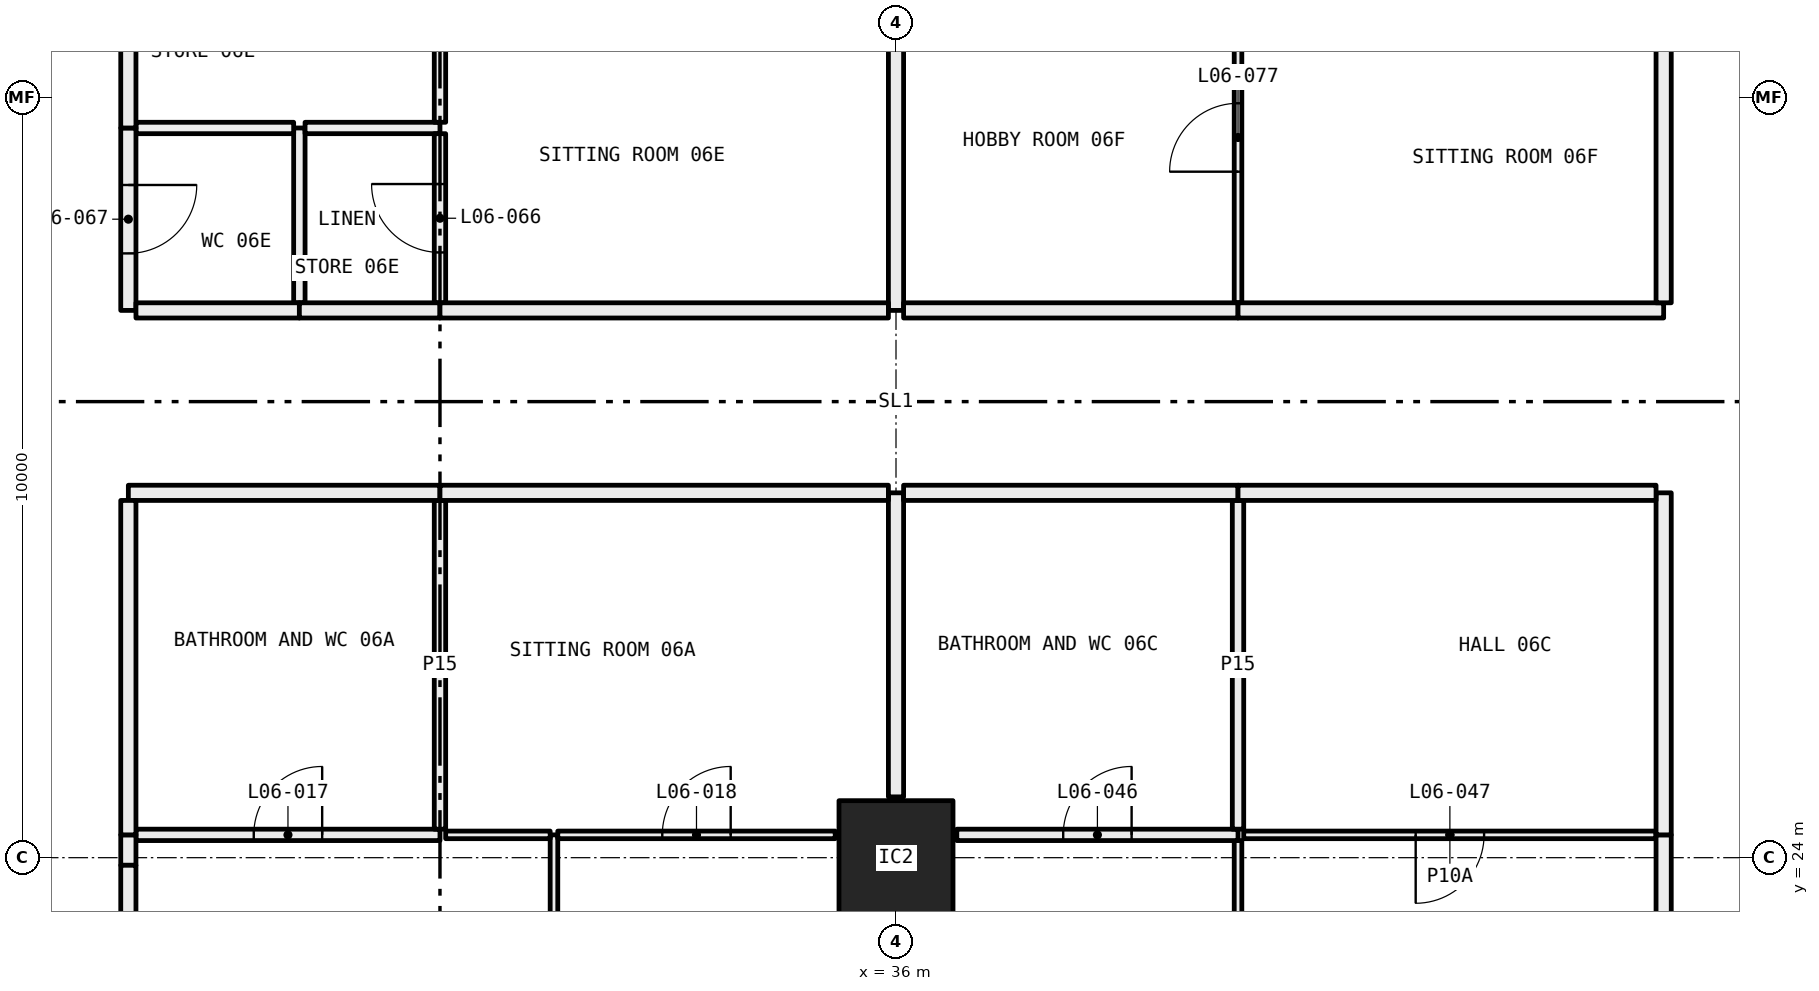
"""IFC4 building model, lengths in metres.
Left out: names, types, materials, properties, quantities, classifications, styles, units other than length and angle.
Written with IfcOpenShell. Run it as: python <this file> out.ifc"""

import sys

from ifc_helpers import new_model, si_unit, direction, frame, frame_2d, origin, origin_2d, place, context, subcontext, project, spatial, rectangle, hollow_rectangle, extrude, element, fill, save


model = new_model("IFC4")
c1 = context("Model", 3, precision=1e-05, world=origin(), true_north=direction((0.0, 1.0)))
c2 = subcontext(c1, "Body", "Model", "MODEL_VIEW")
j1 = project(units=[si_unit("LENGTHUNIT", "METRE"), si_unit("PLANEANGLEUNIT", "RADIAN")], contexts=[c1])
p1 = place(None, origin())
s1 = spatial("IfcSite", under=j1, at=p1, CompositionType="ELEMENT")
p2 = place(p1, origin())
s2 = spatial("IfcBuilding", under=s1, at=p2, CompositionType="ELEMENT")
p3 = place(p2, frame((0.0, 0.0, 33.45)))
s3 = spatial("IfcBuildingStorey", under=s2, at=p3, CompositionType="ELEMENT", Elevation=33.45)
p4 = place(p3, frame((36.0, 24.0, 0.0), z_axis=(0.0, 0.0, 1.0), x_axis=(1.0, 0.0, 0.0)))
e1 = element("IfcColumn", 1, at=p4, inside=s3, PredefinedType="COLUMN", context=c2, shape_type="SweptSolid", body=[
    extrude(hollow_rectangle(XDim=1.5, YDim=1.5, WallThickness=0.065, at=origin_2d()), origin(), (0.0, 0.0, 1.0), 3.05),
])
p5 = place(p3, frame((31.5, 18.05, 0.0), z_axis=(0.0, 0.0, 1.0), x_axis=(0.0, 1.0, 0.0)))
e2 = element("IfcWall", 2, at=p5, inside=s3, PredefinedType="PARTITIONING", context=c2, shape_type="SweptSolid", body=[
    extrude(rectangle(XDim=6.25, YDim=0.1, at=frame_2d((3.125, 0.0))), origin(), (0.0, 0.0, 1.0), 2.45),
])
p6 = place(p5, frame((2.675, 0.0, 0.0)))
e3 = element("IfcOpeningElement", 3, at=p6, cuts=e2, PredefinedType="OPENING", context=c2, shape_type="SweptSolid", body=[
    extrude(rectangle(XDim=0.9, YDim=2.1, at=frame_2d((0.45, 1.05))), frame((0.0, 0.06, 0.0), z_axis=(0.0, -1.0, 0.0), x_axis=(1.0, 0.0, 0.0)), (0.0, 0.0, 1.0), 0.12),
])
p7 = place(p3, frame((30.0, 24.3, 0.0), z_axis=(0.0, 0.0, 1.0), x_axis=(-1.0, 0.0, 0.0)))
e4 = element("IfcWall", 4, at=p7, inside=s3, PredefinedType="PARTITIONING", context=c2, shape_type="SweptSolid", body=[
    extrude(rectangle(XDim=4.0, YDim=0.15, at=frame_2d((2.0, 0.0))), origin(), (0.0, 0.0, 1.0), 3.05),
])
p8 = place(p7, frame((1.55, 0.0, 0.0)))
e5 = element("IfcOpeningElement", 5, at=p8, cuts=e4, PredefinedType="OPENING", context=c2, shape_type="SweptSolid", body=[
    extrude(rectangle(XDim=0.9, YDim=2.1, at=frame_2d((0.45, 1.05))), frame((0.0, 0.085, 0.0), z_axis=(0.0, -1.0, 0.0), x_axis=(1.0, 0.0, 0.0)), (0.0, 0.0, 1.0), 0.17),
])
p9 = place(p3, frame((31.45, 24.3, 0.0), z_axis=(0.0, 0.0, 1.0), x_axis=(-1.0, 0.0, 0.0)))
e6 = element("IfcWall", 6, at=p9, inside=s3, PredefinedType="PARTITIONING", context=c2, shape_type="SweptSolid", body=[
    extrude(rectangle(XDim=1.375, YDim=0.1, at=frame_2d((0.688, 0.0))), origin(), (0.0, 0.0, 1.0), 3.05),
])
p10 = place(p3, frame((25.9, 24.3, 0.0), z_axis=(0.0, 0.0, 1.0), x_axis=(0.0, -1.0, 0.0)))
e7 = element("IfcWall", 7, at=p10, inside=s3, PredefinedType="PARTITIONING", context=c2, shape_type="SweptSolid", body=[
    extrude(rectangle(XDim=0.4, YDim=0.2, at=frame_2d((0.2, 0.0))), origin(), (0.0, 0.0, 1.0), 2.45),
])
p11 = place(p3, frame((25.9, 23.9, 0.0), z_axis=(0.0, 0.0, 1.0), x_axis=(0.0, -1.0, 0.0)))
e8 = element("IfcWall", 8, at=p11, inside=s3, PredefinedType="PARTITIONING", context=c2, shape_type="SweptSolid", body=[
    extrude(rectangle(XDim=5.8, YDim=0.2, at=frame_2d((2.9, 0.0))), origin(), (0.0, 0.0, 1.0), 3.05),
])
p12 = place(p3, frame((35.2, 24.3, 0.0), z_axis=(0.0, 0.0, 1.0), x_axis=(-1.0, 0.0, 0.0)))
e9 = element("IfcWall", 9, at=p12, inside=s3, PredefinedType="PARTITIONING", context=c2, shape_type="SweptSolid", body=[
    extrude(rectangle(XDim=3.65, YDim=0.1, at=frame_2d((1.825, 0.0))), origin(), (0.0, 0.0, 1.0), 3.05),
])
p13 = place(p12, frame((1.375, 0.0, 0.0)))
e10 = element("IfcOpeningElement", 10, at=p13, cuts=e9, PredefinedType="OPENING", context=c2, shape_type="SweptSolid", body=[
    extrude(rectangle(XDim=0.9, YDim=2.1, at=frame_2d((0.45, 1.05))), frame((0.0, 0.06, 0.0), z_axis=(0.0, -1.0, 0.0), x_axis=(1.0, 0.0, 0.0)), (0.0, 0.0, 1.0), 0.12),
])
p14 = place(p3, frame((30.0, 24.375, 0.0), z_axis=(0.0, 0.0, 1.0), x_axis=(0.0, 1.0, 0.0)))
e11 = element("IfcWall", 11, at=p14, inside=s3, PredefinedType="PARTITIONING", context=c2, shape_type="SweptSolid", body=[
    extrude(rectangle(XDim=4.325, YDim=0.15, at=frame_2d((2.163, 0.0))), origin(), (0.0, 0.0, 1.0), 3.05),
])
p15 = place(p3, frame((30.0, 28.8, 0.0), z_axis=(0.0, 0.0, 1.0), x_axis=(-1.0, 0.0, 0.0)))
e12 = element("IfcWall", 12, at=p15, inside=s3, PredefinedType="PARTITIONING", context=c2, shape_type="SweptSolid", body=[
    extrude(rectangle(XDim=4.1, YDim=0.2, at=frame_2d((2.05, 0.0))), origin(), (0.0, 0.0, 1.0), 3.05),
])
p16 = place(p3, frame((25.9, 28.7, 0.0), z_axis=(0.0, 0.0, 1.0), x_axis=(0.0, -1.0, 0.0)))
e13 = element("IfcWall", 13, at=p16, inside=s3, PredefinedType="PARTITIONING", context=c2, shape_type="SweptSolid", body=[
    extrude(rectangle(XDim=4.4, YDim=0.2, at=frame_2d((2.2, 0.0))), origin(), (0.0, 0.0, 1.0), 3.05),
])
p17 = place(p3, frame((36.0, 24.8, 0.0), z_axis=(0.0, 0.0, 1.0), x_axis=(0.0, 1.0, 0.0)))
e14 = element("IfcWall", 14, at=p17, inside=s3, PredefinedType="PARTITIONING", context=c2, shape_type="SweptSolid", body=[
    extrude(rectangle(XDim=4.0, YDim=0.2, at=frame_2d((2.0, 0.0))), origin(), (0.0, 0.0, 1.0), 2.45),
])
p18 = place(p3, frame((35.9, 28.8, 0.0), z_axis=(0.0, 0.0, 1.0), x_axis=(-1.0, 0.0, 0.0)))
e15 = element("IfcWall", 15, at=p18, inside=s3, PredefinedType="PARTITIONING", context=c2, shape_type="SweptSolid", body=[
    extrude(rectangle(XDim=5.9, YDim=0.2, at=frame_2d((2.95, 0.0))), origin(), (0.0, 0.0, 1.0), 3.05),
])
p19 = place(p3, frame((40.5, 18.05, 0.0), z_axis=(0.0, 0.0, 1.0), x_axis=(0.0, 1.0, 0.0)))
e16 = element("IfcWall", 16, at=p19, inside=s3, PredefinedType="PARTITIONING", context=c2, shape_type="SweptSolid", body=[
    extrude(rectangle(XDim=6.175, YDim=0.1, at=frame_2d((3.087, 0.0))), origin(), (0.0, 0.0, 1.0), 2.45),
])
p20 = place(p19, frame((2.637, 0.0, 0.0)))
e17 = element("IfcOpeningElement", 17, at=p20, cuts=e16, PredefinedType="OPENING", context=c2, shape_type="SweptSolid", body=[
    extrude(rectangle(XDim=0.9, YDim=2.1, at=frame_2d((0.45, 1.05))), frame((0.0, 0.06, 0.0), z_axis=(0.0, -1.0, 0.0), x_axis=(1.0, 0.0, 0.0)), (0.0, 0.0, 1.0), 0.12),
])
p21 = place(p3, frame((40.5, 24.3, 0.0), z_axis=(0.0, 0.0, 1.0), x_axis=(-1.0, 0.0, 0.0)))
e18 = element("IfcWall", 18, at=p21, inside=s3, PredefinedType="PARTITIONING", context=c2, shape_type="SweptSolid", body=[
    extrude(rectangle(XDim=3.7, YDim=0.15, at=frame_2d((1.85, 0.0))), origin(), (0.0, 0.0, 1.0), 3.05),
])
p22 = place(p21, frame((1.4, 0.0, 0.0)))
e19 = element("IfcOpeningElement", 19, at=p22, cuts=e18, PredefinedType="OPENING", context=c2, shape_type="SweptSolid", body=[
    extrude(rectangle(XDim=0.9, YDim=2.1, at=frame_2d((0.45, 1.05))), frame((0.0, 0.085, 0.0), z_axis=(0.0, -1.0, 0.0), x_axis=(1.0, 0.0, 0.0)), (0.0, 0.0, 1.0), 0.17),
])
p23 = place(p3, frame((46.0, 24.3, 0.0), z_axis=(0.0, 0.0, 1.0), x_axis=(-1.0, 0.0, 0.0)))
e20 = element("IfcWall", 20, at=p23, inside=s3, PredefinedType="PARTITIONING", context=c2, shape_type="SweptSolid", body=[
    extrude(rectangle(XDim=5.425, YDim=0.1, at=frame_2d((2.712, 0.0))), origin(), (0.0, 0.0, 1.0), 3.05),
])
p24 = place(p23, frame((2.262, 0.0, 0.0)))
e21 = element("IfcOpeningElement", 21, at=p24, cuts=e20, PredefinedType="OPENING", context=c2, shape_type="SweptSolid", body=[
    extrude(rectangle(XDim=0.9, YDim=2.1, at=frame_2d((0.45, 1.05))), frame((0.0, 0.06, 0.0), z_axis=(0.0, -1.0, 0.0), x_axis=(1.0, 0.0, 0.0)), (0.0, 0.0, 1.0), 0.12),
])
p25 = place(p3, frame((46.1, 18.1, 0.0), z_axis=(0.0, 0.0, 1.0), x_axis=(0.0, 1.0, 0.0)))
e22 = element("IfcWall", 22, at=p25, inside=s3, PredefinedType="PARTITIONING", context=c2, shape_type="SweptSolid", body=[
    extrude(rectangle(XDim=6.2, YDim=0.2, at=frame_2d((3.1, 0.0))), origin(), (0.0, 0.0, 1.0), 2.45),
])
p26 = place(p3, frame((40.5, 24.375, 0.0), z_axis=(0.0, 0.0, 1.0), x_axis=(0.0, 1.0, 0.0)))
e23 = element("IfcWall", 23, at=p26, inside=s3, PredefinedType="PARTITIONING", context=c2, shape_type="SweptSolid", body=[
    extrude(rectangle(XDim=4.325, YDim=0.15, at=frame_2d((2.163, 0.0))), origin(), (0.0, 0.0, 1.0), 3.05),
])
p27 = place(p3, frame((40.5, 28.8, 0.0), z_axis=(0.0, 0.0, 1.0), x_axis=(-1.0, 0.0, 0.0)))
e24 = element("IfcWall", 24, at=p27, inside=s3, PredefinedType="PARTITIONING", context=c2, shape_type="SweptSolid", body=[
    extrude(rectangle(XDim=4.4, YDim=0.2, at=frame_2d((2.2, 0.0))), origin(), (0.0, 0.0, 1.0), 3.05),
])
p28 = place(p3, frame((46.1, 24.3, 0.0), z_axis=(0.0, 0.0, 1.0), x_axis=(0.0, 1.0, 0.0)))
e25 = element("IfcWall", 25, at=p28, inside=s3, PredefinedType="PARTITIONING", context=c2, shape_type="SweptSolid", body=[
    extrude(rectangle(XDim=4.5, YDim=0.2, at=frame_2d((2.25, 0.0))), origin(), (0.0, 0.0, 1.0), 3.05),
])
p29 = place(p3, frame((46.0, 28.8, 0.0), z_axis=(0.0, 0.0, 1.0), x_axis=(-1.0, 0.0, 0.0)))
e26 = element("IfcWall", 26, at=p29, inside=s3, PredefinedType="PARTITIONING", context=c2, shape_type="SweptSolid", body=[
    extrude(rectangle(XDim=5.5, YDim=0.2, at=frame_2d((2.75, 0.0))), origin(), (0.0, 0.0, 1.0), 3.05),
])
p30 = place(p3, frame((28.15, 31.3, 0.0), z_axis=(0.0, 0.0, 1.0), x_axis=(0.0, 1.0, 0.0)))
e27 = element("IfcWall", 27, at=p30, inside=s3, PredefinedType="PARTITIONING", context=c2, shape_type="SweptSolid", body=[
    extrude(rectangle(XDim=2.3, YDim=0.15, at=frame_2d((1.15, 0.0))), origin(), (0.0, 0.0, 1.0), 3.05),
])
p31 = place(p3, frame((28.075, 33.6, 0.0), z_axis=(0.0, 0.0, 1.0), x_axis=(-1.0, 0.0, 0.0)))
e28 = element("IfcWall", 28, at=p31, inside=s3, PredefinedType="PARTITIONING", context=c2, shape_type="SweptSolid", body=[
    extrude(rectangle(XDim=2.075, YDim=0.15, at=frame_2d((1.038, 0.0))), origin(), (0.0, 0.0, 1.0), 3.05),
])
p32 = place(p3, frame((25.9, 33.6, 0.0), z_axis=(0.0, 0.0, 1.0), x_axis=(0.0, -1.0, 0.0)))
e29 = element("IfcWall", 29, at=p32, inside=s3, PredefinedType="PARTITIONING", context=c2, shape_type="SweptSolid", body=[
    extrude(rectangle(XDim=2.4, YDim=0.2, at=frame_2d((1.2, 0.0))), origin(), (0.0, 0.0, 1.0), 3.05),
])
p33 = place(p32, frame((0.75, 0.0, 0.0)))
e30 = element("IfcOpeningElement", 30, at=p33, cuts=e29, PredefinedType="OPENING", context=c2, shape_type="SweptSolid", body=[
    extrude(rectangle(XDim=0.9, YDim=2.1, at=frame_2d((0.45, 1.05))), frame((0.0, 0.11, 0.0), z_axis=(0.0, -1.0, 0.0), x_axis=(1.0, 0.0, 0.0)), (0.0, 0.0, 1.0), 0.22),
])
p34 = place(p3, frame((26.0, 31.2, 0.0), z_axis=(0.0, 0.0, 1.0), x_axis=(1.0, 0.0, 0.0)))
e31 = element("IfcWall", 31, at=p34, inside=s3, PredefinedType="PARTITIONING", context=c2, shape_type="SweptSolid", body=[
    extrude(rectangle(XDim=2.15, YDim=0.2, at=frame_2d((1.075, 0.0))), origin(), (0.0, 0.0, 1.0), 3.05),
])
p35 = place(p3, frame((30.0, 33.6, 0.0), z_axis=(0.0, 0.0, 1.0), x_axis=(-1.0, 0.0, 0.0)))
e32 = element("IfcWall", 32, at=p35, inside=s3, PredefinedType="PARTITIONING", context=c2, shape_type="SweptSolid", body=[
    extrude(rectangle(XDim=1.775, YDim=0.15, at=frame_2d((0.887, 0.0))), origin(), (0.0, 0.0, 1.0), 3.05),
])
p36 = place(p3, frame((30.0, 31.3, 0.0), z_axis=(0.0, 0.0, 1.0), x_axis=(0.0, 1.0, 0.0)))
e33 = element("IfcWall", 33, at=p36, inside=s3, PredefinedType="PARTITIONING", context=c2, shape_type="SweptSolid", body=[
    extrude(rectangle(XDim=2.225, YDim=0.15, at=frame_2d((1.112, 0.0))), origin(), (0.0, 0.0, 1.0), 3.05),
])
p37 = place(p36, frame((0.663, 0.0, 0.0)))
e34 = element("IfcOpeningElement", 34, at=p37, cuts=e33, PredefinedType="OPENING", context=c2, shape_type="SweptSolid", body=[
    extrude(rectangle(XDim=0.9, YDim=2.1, at=frame_2d((0.45, 1.05))), frame((0.0, 0.085, 0.0), z_axis=(0.0, -1.0, 0.0), x_axis=(1.0, 0.0, 0.0)), (0.0, 0.0, 1.0), 0.17),
])
p38 = place(p3, frame((28.15, 31.2, 0.0), z_axis=(0.0, 0.0, 1.0), x_axis=(1.0, 0.0, 0.0)))
e35 = element("IfcWall", 35, at=p38, inside=s3, PredefinedType="PARTITIONING", context=c2, shape_type="SweptSolid", body=[
    extrude(rectangle(XDim=1.85, YDim=0.2, at=frame_2d((0.925, 0.0))), origin(), (0.0, 0.0, 1.0), 3.05),
])
p39 = place(p3, frame((30.0, 33.675, 0.0), z_axis=(0.0, 0.0, 1.0), x_axis=(0.0, 1.0, 0.0)))
e36 = element("IfcWall", 36, at=p39, inside=s3, PredefinedType="PARTITIONING", context=c2, shape_type="SweptSolid", body=[
    extrude(rectangle(XDim=1.95, YDim=0.15, at=frame_2d((0.975, 0.0))), origin(), (0.0, 0.0, 1.0), 3.05),
])
p40 = place(p3, frame((25.9, 35.7, 0.0), z_axis=(0.0, 0.0, 1.0), x_axis=(0.0, -1.0, 0.0)))
e37 = element("IfcWall", 37, at=p40, inside=s3, PredefinedType="PARTITIONING", context=c2, shape_type="SweptSolid", body=[
    extrude(rectangle(XDim=2.1, YDim=0.2, at=frame_2d((1.05, 0.0))), origin(), (0.0, 0.0, 1.0), 3.05),
])
p41 = place(p3, frame((36.0, 31.2, 0.0), z_axis=(0.0, 0.0, 1.0), x_axis=(0.0, 1.0, 0.0)))
e38 = element("IfcWall", 38, at=p41, inside=s3, PredefinedType="PARTITIONING", context=c2, shape_type="SweptSolid", body=[
    extrude(rectangle(XDim=4.0, YDim=0.2, at=frame_2d((2.0, 0.0))), origin(), (0.0, 0.0, 1.0), 2.45),
])
p42 = place(p3, frame((30.0, 31.2, 0.0), z_axis=(0.0, 0.0, 1.0), x_axis=(1.0, 0.0, 0.0)))
e39 = element("IfcWall", 39, at=p42, inside=s3, PredefinedType="PARTITIONING", context=c2, shape_type="SweptSolid", body=[
    extrude(rectangle(XDim=5.9, YDim=0.2, at=frame_2d((2.95, 0.0))), origin(), (0.0, 0.0, 1.0), 3.05),
])
p43 = place(p3, frame((40.5, 31.3, 0.0), z_axis=(0.0, 0.0, 1.0), x_axis=(0.0, 1.0, 0.0)))
e40 = element("IfcWall", 40, at=p43, inside=s3, PredefinedType="PARTITIONING", context=c2, shape_type="SweptSolid", body=[
    extrude(rectangle(XDim=4.35, YDim=0.1, at=frame_2d((2.175, 0.0))), origin(), (0.0, 0.0, 1.0), 3.05),
])
p44 = place(p43, frame((1.725, 0.0, 0.0)))
e41 = element("IfcOpeningElement", 41, at=p44, cuts=e40, PredefinedType="OPENING", context=c2, shape_type="SweptSolid", body=[
    extrude(rectangle(XDim=0.9, YDim=2.1, at=frame_2d((0.45, 1.05))), frame((0.0, 0.06, 0.0), z_axis=(0.0, -1.0, 0.0), x_axis=(1.0, 0.0, 0.0)), (0.0, 0.0, 1.0), 0.12),
])
p45 = place(p3, frame((36.1, 31.2, 0.0), z_axis=(0.0, 0.0, 1.0), x_axis=(1.0, 0.0, 0.0)))
e42 = element("IfcWall", 42, at=p45, inside=s3, PredefinedType="PARTITIONING", context=c2, shape_type="SweptSolid", body=[
    extrude(rectangle(XDim=4.4, YDim=0.2, at=frame_2d((2.2, 0.0))), origin(), (0.0, 0.0, 1.0), 3.05),
])
p46 = place(p3, frame((40.5, 31.2, 0.0), z_axis=(0.0, 0.0, 1.0), x_axis=(1.0, 0.0, 0.0)))
e43 = element("IfcWall", 43, at=p46, inside=s3, PredefinedType="PARTITIONING", context=c2, shape_type="SweptSolid", body=[
    extrude(rectangle(XDim=5.6, YDim=0.2, at=frame_2d((2.8, 0.0))), origin(), (0.0, 0.0, 1.0), 3.05),
])
p47 = place(p3, frame((46.1, 31.3, 0.0), z_axis=(0.0, 0.0, 1.0), x_axis=(0.0, 1.0, 0.0)))
e44 = element("IfcWall", 44, at=p47, inside=s3, PredefinedType="PARTITIONING", context=c2, shape_type="SweptSolid", body=[
    extrude(rectangle(XDim=4.4, YDim=0.2, at=frame_2d((2.2, 0.0))), origin(), (0.0, 0.0, 1.0), 3.05),
])
p48 = place(p8, frame((0.9, 0.0, 0.0), x_axis=(-1.0, 0.0, 0.0)))
e45 = element("IfcDoor", 45, at=p48, inside=s3, OperationType="SINGLE_SWING_LEFT", PredefinedType="DOOR", context=c2, shape_type="SweptSolid", body=[
    extrude(rectangle(XDim=0.9, YDim=2.1, at=frame_2d((0.45, 1.05))), frame((0.0, 0.025, 0.0), z_axis=(0.0, -1.0, 0.0), x_axis=(1.0, 0.0, 0.0)), (0.0, 0.0, 1.0), 0.05),
])
fill(e5, e45)
p49 = place(p13, frame((0.9, 0.0, 0.0), x_axis=(-1.0, 0.0, 0.0)))
e46 = element("IfcDoor", 46, at=p49, inside=s3, OperationType="SINGLE_SWING_LEFT", PredefinedType="DOOR", context=c2, shape_type="SweptSolid", body=[
    extrude(rectangle(XDim=0.9, YDim=2.1, at=frame_2d((0.45, 1.05))), frame((0.0, 0.025, 0.0), z_axis=(0.0, -1.0, 0.0), x_axis=(1.0, 0.0, 0.0)), (0.0, 0.0, 1.0), 0.05),
])
fill(e10, e46)
p50 = place(p22, frame((0.9, 0.0, 0.0), x_axis=(-1.0, 0.0, 0.0)))
e47 = element("IfcDoor", 47, at=p50, inside=s3, OperationType="SINGLE_SWING_LEFT", PredefinedType="DOOR", context=c2, shape_type="SweptSolid", body=[
    extrude(rectangle(XDim=0.9, YDim=2.1, at=frame_2d((0.45, 1.05))), frame((0.0, 0.025, 0.0), z_axis=(0.0, -1.0, 0.0), x_axis=(1.0, 0.0, 0.0)), (0.0, 0.0, 1.0), 0.05),
])
fill(e19, e47)
p51 = place(p24, origin())
e48 = element("IfcDoor", 48, at=p51, inside=s3, OperationType="SINGLE_SWING_LEFT", PredefinedType="DOOR", context=c2, shape_type="SweptSolid", body=[
    extrude(rectangle(XDim=0.9, YDim=2.1, at=frame_2d((0.45, 1.05))), frame((0.0, 0.025, 0.0), z_axis=(0.0, -1.0, 0.0), x_axis=(1.0, 0.0, 0.0)), (0.0, 0.0, 1.0), 0.05),
])
fill(e21, e48)
p52 = place(p37, origin())
e49 = element("IfcDoor", 49, at=p52, inside=s3, OperationType="SINGLE_SWING_LEFT", PredefinedType="DOOR", context=c2, shape_type="SweptSolid", body=[
    extrude(rectangle(XDim=0.9, YDim=2.1, at=frame_2d((0.45, 1.05))), frame((0.0, 0.025, 0.0), z_axis=(0.0, -1.0, 0.0), x_axis=(1.0, 0.0, 0.0)), (0.0, 0.0, 1.0), 0.05),
])
fill(e34, e49)
p53 = place(p33, origin())
e50 = element("IfcDoor", 50, at=p53, inside=s3, OperationType="SINGLE_SWING_RIGHT", PredefinedType="DOOR", context=c2, shape_type="SweptSolid", body=[
    extrude(rectangle(XDim=0.9, YDim=2.1, at=frame_2d((0.45, 1.05))), frame((0.0, 0.025, 0.0), z_axis=(0.0, -1.0, 0.0), x_axis=(1.0, 0.0, 0.0)), (0.0, 0.0, 1.0), 0.05),
])
fill(e30, e50)
p54 = place(p44, origin())
e51 = element("IfcDoor", 51, at=p54, inside=s3, OperationType="SINGLE_SWING_RIGHT", PredefinedType="DOOR", context=c2, shape_type="SweptSolid", body=[
    extrude(rectangle(XDim=0.9, YDim=2.1, at=frame_2d((0.45, 1.05))), frame((0.0, 0.025, 0.0), z_axis=(0.0, -1.0, 0.0), x_axis=(1.0, 0.0, 0.0)), (0.0, 0.0, 1.0), 0.05),
])
fill(e41, e51)
save(model, sys.argv[1])
